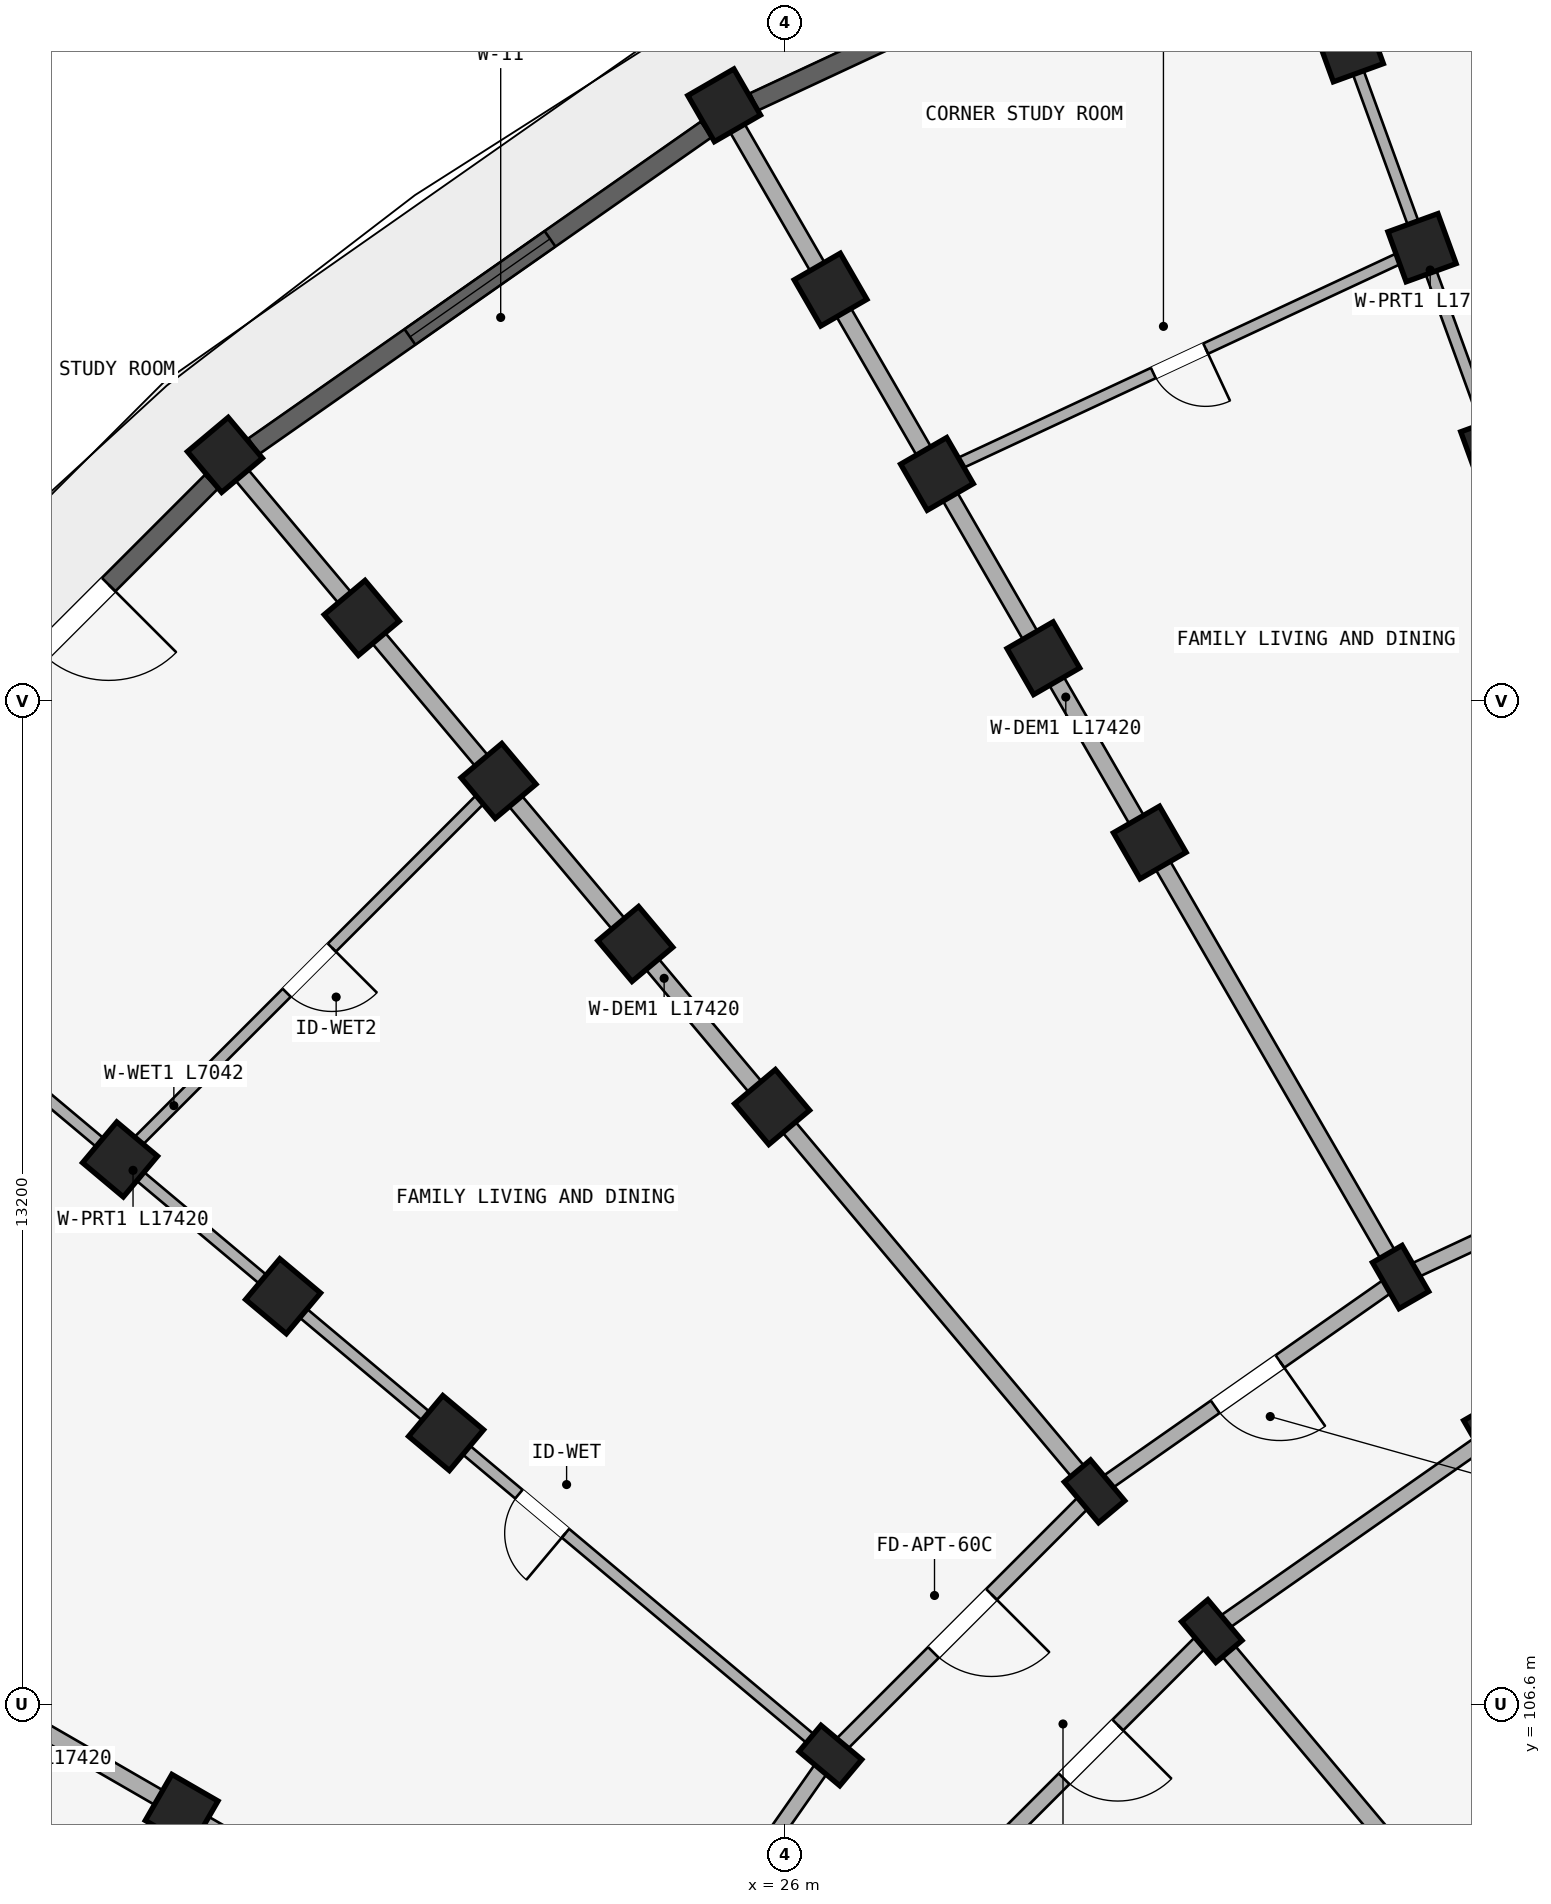
"""IFC4 building model, lengths in metres.
Left out: names, types, materials, properties, quantities, classifications, styles, units other than length and angle.
Written with IfcOpenShell. Run it as: python <this file> out.ifc"""

import sys

from ifc_helpers import new_model, si_unit, direction, frame, frame_2d, origin, origin_2d, place, context, subcontext, project, spatial, rectangle, extrude, element, fill, save


model = new_model("IFC4")
c1 = context("Model", 3, precision=1e-05, world=origin(), true_north=direction((0.0, 1.0)))
c2 = subcontext(c1, "Body", "Model", "MODEL_VIEW")
j1 = project(units=[si_unit("LENGTHUNIT", "METRE"), si_unit("PLANEANGLEUNIT", "RADIAN")], contexts=[c1])
p1 = place(None, origin())
s1 = spatial("IfcSite", under=j1, at=p1, CompositionType="ELEMENT")
p2 = place(p1, origin())
s2 = spatial("IfcBuilding", under=s1, at=p2, CompositionType="ELEMENT")
p3 = place(p2, frame((0.0, 0.0, 21.3)))
s3 = spatial("IfcBuildingStorey", under=s2, at=p3, CompositionType="ELEMENT", Elevation=21.3)
for number, where, z_axis, x_axis in (
    (1, (35.34, 123.132, 0.0), (0.0, 0.0, 1.0), (0.94, 0.342, 0.0)),
    (2, (34.382, 125.764, 0.0), (0.0, 0.0, 1.0), (0.94, 0.342, 0.0)),
    (3, (33.425, 128.395, 0.0), (0.0, 0.0, 1.0), (0.94, 0.342, 0.0)),
):
    element("IfcColumn", number, at=place(p3, frame(where, z_axis=z_axis, x_axis=x_axis)), inside=s3, PredefinedType="COLUMN", context=c2, shape_type="SweptSolid", body=[
        extrude(rectangle(XDim=0.7, YDim=0.7, at=origin_2d()), origin(), (0.0, 0.0, 1.0), 2.93),
    ])
for number, where, z_axis, x_axis in (
    (4, (35.3, 110.144, 0.0), (0.0, 0.0, 1.0), (0.866, 0.5, 0.0)),
    (5, (34.1, 112.222, 0.0), (0.0, 0.0, 1.0), (0.866, 0.5, 0.0)),
):
    element("IfcColumn", number, at=place(p3, frame(where, z_axis=z_axis, x_axis=x_axis)), inside=s3, PredefinedType="COLUMN", context=c2, shape_type="SweptSolid", body=[
        extrude(rectangle(XDim=0.45, YDim=0.7, at=origin_2d()), origin(), (0.0, 0.0, 1.0), 2.93),
    ])
for number, where, z_axis, x_axis in (
    (6, (30.8, 117.938, 0.0), (0.0, 0.0, 1.0), (0.866, 0.5, 0.0)),
    (7, (29.4, 120.363, 0.0), (0.0, 0.0, 1.0), (0.866, 0.5, 0.0)),
    (8, (28.0, 122.787, 0.0), (0.0, 0.0, 1.0), (0.866, 0.5, 0.0)),
    (9, (26.6, 125.212, 0.0), (0.0, 0.0, 1.0), (0.866, 0.5, 0.0)),
    (10, (25.2, 127.637, 0.0), (0.0, 0.0, 1.0), (0.866, 0.5, 0.0)),
):
    element("IfcColumn", number, at=place(p3, frame(where, z_axis=z_axis, x_axis=x_axis)), inside=s3, PredefinedType="COLUMN", context=c2, shape_type="SweptSolid", body=[
        extrude(rectangle(XDim=0.7, YDim=0.7, at=origin_2d()), origin(), (0.0, 0.0, 1.0), 2.93),
    ])
for number, where, z_axis, x_axis in (
    (11, (31.616, 107.564, 0.0), (0.0, 0.0, 1.0), (0.766, 0.643, 0.0)),
    (12, (30.073, 109.402, 0.0), (0.0, 0.0, 1.0), (0.766, 0.643, 0.0)),
):
    element("IfcColumn", number, at=place(p3, frame(where, z_axis=z_axis, x_axis=x_axis)), inside=s3, PredefinedType="COLUMN", context=c2, shape_type="SweptSolid", body=[
        extrude(rectangle(XDim=0.45, YDim=0.7, at=origin_2d()), origin(), (0.0, 0.0, 1.0), 2.93),
    ])
for number, where, z_axis, x_axis in (
    (13, (25.831, 114.458, 0.0), (0.0, 0.0, 1.0), (0.766, 0.643, 0.0)),
    (14, (24.031, 116.603, 0.0), (0.0, 0.0, 1.0), (0.766, 0.643, 0.0)),
    (15, (22.231, 118.748, 0.0), (0.0, 0.0, 1.0), (0.766, 0.643, 0.0)),
    (16, (20.432, 120.893, 0.0), (0.0, 0.0, 1.0), (0.766, 0.643, 0.0)),
    (17, (18.632, 123.038, 0.0), (0.0, 0.0, 1.0), (0.766, 0.643, 0.0)),
):
    element("IfcColumn", number, at=place(p3, frame(where, z_axis=z_axis, x_axis=x_axis)), inside=s3, PredefinedType="COLUMN", context=c2, shape_type="SweptSolid", body=[
        extrude(rectangle(XDim=0.7, YDim=0.7, at=origin_2d()), origin(), (0.0, 0.0, 1.0), 2.93),
    ])
p4 = place(p3, frame((26.598, 105.927, 0.0), z_axis=(0.0, 0.0, 1.0), x_axis=(0.642787609687, 0.766044443119, 0.0)))
e18 = element("IfcColumn", 18, at=p4, inside=s3, PredefinedType="COLUMN", context=c2, shape_type="SweptSolid", body=[
    extrude(rectangle(XDim=0.45, YDim=0.7, at=origin_2d()), origin(), (0.0, 0.0, 1.0), 2.93),
])
for number, where, z_axis, x_axis in (
    (19, (21.542, 110.169, 0.0), (0.0, 0.0, 1.0), (0.643, 0.766, 0.0)),
    (20, (19.397, 111.969, 0.0), (0.0, 0.0, 1.0), (0.643, 0.766, 0.0)),
    (21, (17.252, 113.769, 0.0), (0.0, 0.0, 1.0), (0.643, 0.766, 0.0)),
    (22, (18.062, 105.2, 0.0), (0.0, 0.0, 1.0), (0.5, 0.866, 0.0)),
):
    element("IfcColumn", number, at=place(p3, frame(where, z_axis=z_axis, x_axis=x_axis)), inside=s3, PredefinedType="COLUMN", context=c2, shape_type="SweptSolid", body=[
        extrude(rectangle(XDim=0.7, YDim=0.7, at=origin_2d()), origin(), (0.0, 0.0, 1.0), 2.93),
    ])
p5 = place(p3, frame((38.555, 114.299, 0.0), z_axis=(0.0, 0.0, 1.0), x_axis=(-0.906302381024, -0.422629854778, 0.0)))
e23 = element("IfcWall", 23, at=p5, inside=s3, PredefinedType="STANDARD", context=c2, shape_type="SweptSolid", body=[
    extrude(rectangle(XDim=4.915, YDim=0.2, at=frame_2d((2.458, 0.0))), origin(), (0.0, 0.0, 1.0), 2.372),
])
p6 = place(p3, frame((35.3, 110.144, 0.0), z_axis=(0.0, 0.0, 1.0), x_axis=(-0.819155404658, -0.573571637217, 0.0)))
e24 = element("IfcWall", 24, at=p6, inside=s3, PredefinedType="STANDARD", context=c2, shape_type="SweptSolid", body=[
    extrude(rectangle(XDim=4.497, YDim=0.2, at=frame_2d((2.249, 0.0))), origin(), (0.0, 0.0, 1.0), 2.372),
])
p7 = place(p3, frame((34.1, 112.222, 0.0), z_axis=(0.0, 0.0, 1.0), x_axis=(-0.819140911474, -0.573592335331, 0.0)))
e25 = element("IfcWall", 25, at=p7, inside=s3, PredefinedType="STANDARD", context=c2, shape_type="SweptSolid", body=[
    extrude(rectangle(XDim=4.916, YDim=0.2, at=frame_2d((2.458, 0.0))), origin(), (0.0, 0.0, 1.0), 2.372),
])
p8 = place(p7, frame((1.938, 0.0, 0.0)))
e26 = element("IfcOpeningElement", 26, at=p8, cuts=e25, PredefinedType="OPENING", context=c2, shape_type="SweptSolid", body=[
    extrude(rectangle(XDim=1.04, YDim=2.15, at=frame_2d((0.52, 1.075))), frame((0.0, 0.11, 0.0), z_axis=(0.0, -1.0, 0.0), x_axis=(1.0, 0.0, 0.0)), (0.0, 0.0, 1.0), 0.22),
])
p9 = place(p3, frame((31.616, 107.564, 0.0), z_axis=(0.0, 0.0, 1.0), x_axis=(-0.707106781187, -0.707106781187, 0.0)))
e27 = element("IfcWall", 27, at=p9, inside=s3, PredefinedType="STANDARD", context=c2, shape_type="SweptSolid", body=[
    extrude(rectangle(XDim=4.497, YDim=0.2, at=frame_2d((2.249, 0.0))), origin(), (0.0, 0.0, 1.0), 2.372),
])
p10 = place(p9, frame((1.749, 0.0, 0.0)))
e28 = element("IfcOpeningElement", 28, at=p10, cuts=e27, PredefinedType="OPENING", context=c2, shape_type="SweptSolid", body=[
    extrude(rectangle(XDim=1.0, YDim=2.15, at=frame_2d((0.5, 1.075))), frame((0.0, 0.11, 0.0), z_axis=(0.0, -1.0, 0.0), x_axis=(1.0, 0.0, 0.0)), (0.0, 0.0, 1.0), 0.22),
])
p11 = place(p3, frame((30.073, 109.402, 0.0), z_axis=(0.0, 0.0, 1.0), x_axis=(-0.707106781187, -0.707106781187, 0.0)))
e29 = element("IfcWall", 29, at=p11, inside=s3, PredefinedType="STANDARD", context=c2, shape_type="SweptSolid", body=[
    extrude(rectangle(XDim=4.916, YDim=0.2, at=frame_2d((2.458, 0.0))), origin(), (0.0, 0.0, 1.0), 2.372),
])
p12 = place(p11, frame((1.918, 0.0, 0.0)))
e30 = element("IfcOpeningElement", 30, at=p12, cuts=e29, PredefinedType="OPENING", context=c2, shape_type="SweptSolid", body=[
    extrude(rectangle(XDim=1.08, YDim=2.15, at=frame_2d((0.54, 1.075))), frame((0.0, 0.11, 0.0), z_axis=(0.0, -1.0, 0.0), x_axis=(1.0, 0.0, 0.0)), (0.0, 0.0, 1.0), 0.22),
])
p13 = place(p3, frame((26.598, 105.927, 0.0), z_axis=(0.0, 0.0, 1.0), x_axis=(-0.573592335331, -0.819140911474, 0.0)))
e31 = element("IfcWall", 31, at=p13, inside=s3, PredefinedType="STANDARD", context=c2, shape_type="SweptSolid", body=[
    extrude(rectangle(XDim=4.916, YDim=0.2, at=frame_2d((2.458, 0.0))), origin(), (0.0, 0.0, 1.0), 2.372),
])
p14 = place(p3, frame((38.521, 114.393, 0.0), z_axis=(0.0, 0.0, 1.0), x_axis=(-0.342022120477, 0.939691901159, 0.0)))
e32 = element("IfcWall", 32, at=p14, inside=s3, PredefinedType="PARTITIONING", context=c2, shape_type="SweptSolid", body=[
    extrude(rectangle(XDim=17.42, YDim=0.15, at=frame_2d((8.71, 0.0))), origin(), (0.0, 0.0, 1.0), 2.372),
])
p15 = place(p14, frame((4.45, 0.0, 0.0)))
e33 = element("IfcOpeningElement", 33, at=p15, cuts=e32, PredefinedType="OPENING", context=c2, shape_type="SweptSolid", body=[
    extrude(rectangle(XDim=0.8, YDim=2.1, at=frame_2d((0.4, 1.05))), frame((0.0, 0.085, 0.0), z_axis=(0.0, -1.0, 0.0), x_axis=(1.0, 0.0, 0.0)), (0.0, 0.0, 1.0), 0.17),
])
p16 = place(p3, frame((34.05, 112.309, 0.0), z_axis=(0.0, 0.0, 1.0), x_axis=(-0.499997843263, 0.866026648973, 0.0)))
e34 = element("IfcWall", 34, at=p16, inside=s3, PredefinedType="STANDARD", context=c2, shape_type="SweptSolid", body=[
    extrude(rectangle(XDim=17.42, YDim=0.22, at=frame_2d((8.71, 0.0))), origin(), (0.0, 0.0, 1.0), 2.372),
])
p17 = place(p3, frame((35.987, 102.355, 0.0), z_axis=(0.0, 0.0, 1.0), x_axis=(-0.642784846501, 0.766046761698, 0.0)))
e35 = element("IfcWall", 35, at=p17, inside=s3, PredefinedType="STANDARD", context=c2, shape_type="SweptSolid", body=[
    extrude(rectangle(XDim=6.75, YDim=0.22, at=frame_2d((3.375, 0.0))), origin(), (0.0, 0.0, 1.0), 2.372),
])
p18 = place(p3, frame((30.009, 109.479, 0.0), z_axis=(0.0, 0.0, 1.0), x_axis=(-0.642784757967, 0.766046835987, 0.0)))
e36 = element("IfcWall", 36, at=p18, inside=s3, PredefinedType="STANDARD", context=c2, shape_type="SweptSolid", body=[
    extrude(rectangle(XDim=17.42, YDim=0.22, at=frame_2d((8.71, 0.0))), origin(), (0.0, 0.0, 1.0), 2.372),
])
p19 = place(p3, frame((26.521, 105.991, 0.0), z_axis=(0.0, 0.0, 1.0), x_axis=(-0.766046835987, 0.642784757967, 0.0)))
e37 = element("IfcWall", 37, at=p19, inside=s3, PredefinedType="PARTITIONING", context=c2, shape_type="SweptSolid", body=[
    extrude(rectangle(XDim=17.42, YDim=0.15, at=frame_2d((8.71, 0.0))), origin(), (0.0, 0.0, 1.0), 2.372),
])
p20 = place(p19, frame((4.45, 0.0, 0.0)))
e38 = element("IfcOpeningElement", 38, at=p20, cuts=e37, PredefinedType="OPENING", context=c2, shape_type="SweptSolid", body=[
    extrude(rectangle(XDim=0.8, YDim=2.1, at=frame_2d((0.4, 1.05))), frame((0.0, 0.085, 0.0), z_axis=(0.0, -1.0, 0.0), x_axis=(1.0, 0.0, 0.0)), (0.0, 0.0, 1.0), 0.17),
])
p21 = place(p3, frame((23.691, 101.95, 0.0), z_axis=(0.0, 0.0, 1.0), x_axis=(-0.866026648973, 0.499997843263, 0.0)))
e39 = element("IfcWall", 39, at=p21, inside=s3, PredefinedType="STANDARD", context=c2, shape_type="SweptSolid", body=[
    extrude(rectangle(XDim=17.42, YDim=0.22, at=frame_2d((8.71, 0.0))), origin(), (0.0, 0.0, 1.0), 2.372),
])
p22 = place(p3, frame((34.382, 125.764, 0.0), z_axis=(0.0, 0.0, 1.0), x_axis=(-0.906297360311, -0.422640621205, 0.0)))
e40 = element("IfcWall", 40, at=p22, inside=s3, PredefinedType="PLUMBINGWALL", context=c2, shape_type="SweptSolid", body=[
    extrude(rectangle(XDim=7.042, YDim=0.15, at=frame_2d((3.521, 0.0))), origin(), (0.0, 0.0, 1.0), 2.372),
])
p23 = place(p22, frame((3.141, 0.0, 0.0)))
e41 = element("IfcOpeningElement", 41, at=p23, cuts=e40, PredefinedType="OPENING", context=c2, shape_type="SweptSolid", body=[
    extrude(rectangle(XDim=0.76, YDim=2.05, at=frame_2d((0.38, 1.025))), frame((0.0, 0.085, 0.0), z_axis=(0.0, -1.0, 0.0), x_axis=(1.0, 0.0, 0.0)), (0.0, 0.0, 1.0), 0.17),
])
p24 = place(p3, frame((22.231, 118.748, 0.0), z_axis=(0.0, 0.0, 1.0), x_axis=(-0.707106781187, -0.707106781187, 0.0)))
e42 = element("IfcWall", 42, at=p24, inside=s3, PredefinedType="PLUMBINGWALL", context=c2, shape_type="SweptSolid", body=[
    extrude(rectangle(XDim=7.042, YDim=0.15, at=frame_2d((3.521, 0.0))), origin(), (0.0, 0.0, 1.0), 2.372),
])
p25 = place(p24, frame((3.101, 0.0, 0.0)))
e43 = element("IfcOpeningElement", 43, at=p25, cuts=e42, PredefinedType="OPENING", context=c2, shape_type="SweptSolid", body=[
    extrude(rectangle(XDim=0.84, YDim=2.1, at=frame_2d((0.42, 1.05))), frame((0.0, 0.085, 0.0), z_axis=(0.0, -1.0, 0.0), x_axis=(1.0, 0.0, 0.0)), (0.0, 0.0, 1.0), 0.17),
])
p26 = place(p3, frame((32.179, 130.754, 0.0), z_axis=(0.0, 0.0, 1.0), x_axis=(-0.90630327107, -0.422627946127, 0.0)))
e44 = element("IfcWall", 44, at=p26, inside=s3, PredefinedType="STANDARD", context=c2, shape_type="SweptSolid", body=[
    extrude(rectangle(XDim=7.267, YDim=0.25, at=frame_2d((3.633, 0.0))), origin(), (0.0, 0.0, 1.0), 2.472),
])
p27 = place(p26, frame((2.808, 0.0, 0.522)))
e45 = element("IfcOpeningElement", 45, at=p27, cuts=e44, PredefinedType="OPENING", context=c2, shape_type="SweptSolid", body=[
    extrude(rectangle(XDim=1.65, YDim=1.75, at=frame_2d((0.825, 0.875))), frame((0.0, 0.135, 0.0), z_axis=(0.0, -1.0, 0.0), x_axis=(1.0, 0.0, 0.0)), (0.0, 0.0, 1.0), 0.27),
])
p28 = place(p3, frame((24.964, 127.319, 0.0), z_axis=(0.0, 0.0, 1.0), x_axis=(-0.819159308599, -0.573566061701, 0.0)))
e46 = element("IfcWall", 46, at=p28, inside=s3, PredefinedType="STANDARD", context=c2, shape_type="SweptSolid", body=[
    extrude(rectangle(XDim=7.267, YDim=0.25, at=frame_2d((3.633, 0.0))), origin(), (0.0, 0.0, 1.0), 2.472),
])
p29 = place(p28, frame((2.508, 0.0, 0.322)))
e47 = element("IfcOpeningElement", 47, at=p29, cuts=e46, PredefinedType="OPENING", context=c2, shape_type="SweptSolid", body=[
    extrude(rectangle(XDim=2.25, YDim=1.95, at=frame_2d((1.125, 0.975))), frame((0.0, 0.135, 0.0), z_axis=(0.0, -1.0, 0.0), x_axis=(1.0, 0.0, 0.0)), (0.0, 0.0, 1.0), 0.27),
])
p30 = place(p3, frame((18.454, 122.684, 0.0), z_axis=(0.0, 0.0, 1.0), x_axis=(-0.707106781187, -0.707106781187, 0.0)))
e48 = element("IfcWall", 48, at=p30, inside=s3, PredefinedType="STANDARD", context=c2, shape_type="SweptSolid", body=[
    extrude(rectangle(XDim=7.267, YDim=0.25, at=frame_2d((3.633, 0.0))), origin(), (0.0, 0.0, 1.0), 2.472),
])
p31 = place(p30, frame((4.766, 0.0, 0.472)))
e49 = element("IfcOpeningElement", 49, at=p31, cuts=e48, PredefinedType="OPENING", context=c2, shape_type="SweptSolid", body=[
    extrude(rectangle(XDim=1.2, YDim=1.5, at=frame_2d((0.6, 0.75))), frame((0.0, 0.135, 0.0), z_axis=(0.0, -1.0, 0.0), x_axis=(1.0, 0.0, 0.0)), (0.0, 0.0, 1.0), 0.27),
])
p32 = place(p30, frame((1.913, 0.0, 0.0)))
e50 = element("IfcOpeningElement", 50, at=p32, cuts=e48, PredefinedType="OPENING", context=c2, shape_type="SweptSolid", body=[
    extrude(rectangle(XDim=1.26, YDim=2.15, at=frame_2d((0.63, 1.075))), frame((0.0, 0.135, 0.0), z_axis=(0.0, -1.0, 0.0), x_axis=(1.0, 0.0, 0.0)), (0.0, 0.0, 1.0), 0.27),
])
p33 = place(p29, origin())
e51 = element("IfcWindow", 51, at=p33, inside=s3, PartitioningType="TRIPLE_PANEL_VERTICAL", PredefinedType="WINDOW", context=c2, shape_type="SweptSolid", body=[
    extrude(rectangle(XDim=2.25, YDim=1.95, at=frame_2d((1.125, 0.975))), frame((0.0, 0.03, 0.0), z_axis=(0.0, -1.0, 0.0), x_axis=(1.0, 0.0, 0.0)), (0.0, 0.0, 1.0), 0.06),
])
fill(e47, e51)
p34 = place(p20, origin())
e52 = element("IfcDoor", 52, at=p34, inside=s3, OperationType="SINGLE_SWING_LEFT", PredefinedType="DOOR", context=c2, shape_type="SweptSolid", body=[
    extrude(rectangle(XDim=0.8, YDim=2.1, at=frame_2d((0.4, 1.05))), frame((0.0, 0.025, 0.0), z_axis=(0.0, -1.0, 0.0), x_axis=(1.0, 0.0, 0.0)), (0.0, 0.0, 1.0), 0.05),
])
fill(e38, e52)
p35 = place(p23, origin())
e53 = element("IfcDoor", 53, at=p35, inside=s3, OperationType="SINGLE_SWING_LEFT", PredefinedType="DOOR", context=c2, shape_type="SweptSolid", body=[
    extrude(rectangle(XDim=0.76, YDim=2.05, at=frame_2d((0.38, 1.025))), frame((0.0, 0.025, 0.0), z_axis=(0.0, -1.0, 0.0), x_axis=(1.0, 0.0, 0.0)), (0.0, 0.0, 1.0), 0.05),
])
fill(e41, e53)
p36 = place(p8, frame((1.04, 0.0, 0.0), z_axis=(0.0, 0.0, 1.0), x_axis=(-1.0, 0.0, 0.0)))
e54 = element("IfcDoor", 54, at=p36, inside=s3, OperationType="SINGLE_SWING_RIGHT", PredefinedType="DOOR", context=c2, shape_type="SweptSolid", body=[
    extrude(rectangle(XDim=1.04, YDim=2.15, at=frame_2d((0.52, 1.075))), frame((0.0, 0.025, 0.0), z_axis=(0.0, -1.0, 0.0), x_axis=(1.0, 0.0, 0.0)), (0.0, 0.0, 1.0), 0.05),
])
fill(e26, e54)
p37 = place(p12, origin())
e55 = element("IfcDoor", 55, at=p37, inside=s3, OperationType="SINGLE_SWING_LEFT", PredefinedType="DOOR", context=c2, shape_type="SweptSolid", body=[
    extrude(rectangle(XDim=1.08, YDim=2.15, at=frame_2d((0.54, 1.075))), frame((0.0, 0.025, 0.0), z_axis=(0.0, -1.0, 0.0), x_axis=(1.0, 0.0, 0.0)), (0.0, 0.0, 1.0), 0.05),
])
fill(e30, e55)
p38 = place(p25, frame((0.84, 0.0, 0.0), z_axis=(0.0, 0.0, 1.0), x_axis=(-1.0, 0.0, 0.0)))
e56 = element("IfcDoor", 56, at=p38, inside=s3, OperationType="SINGLE_SWING_RIGHT", PredefinedType="DOOR", context=c2, shape_type="SweptSolid", body=[
    extrude(rectangle(XDim=0.84, YDim=2.1, at=frame_2d((0.42, 1.05))), frame((0.0, 0.025, 0.0), z_axis=(0.0, -1.0, 0.0), x_axis=(1.0, 0.0, 0.0)), (0.0, 0.0, 1.0), 0.05),
])
fill(e43, e56)
p39 = place(p10, origin())
e57 = element("IfcDoor", 57, at=p39, inside=s3, OperationType="SINGLE_SWING_LEFT", PredefinedType="DOOR", context=c2, shape_type="SweptSolid", body=[
    extrude(rectangle(XDim=1.0, YDim=2.15, at=frame_2d((0.5, 1.075))), frame((0.0, 0.025, 0.0), z_axis=(0.0, -1.0, 0.0), x_axis=(1.0, 0.0, 0.0)), (0.0, 0.0, 1.0), 0.05),
])
fill(e28, e57)
p40 = place(p32, frame((1.26, 0.0, 0.0), z_axis=(0.0, 0.0, 1.0), x_axis=(-1.0, 0.0, 0.0)))
e58 = element("IfcDoor", 58, at=p40, inside=s3, OperationType="SINGLE_SWING_RIGHT", PredefinedType="DOOR", context=c2, shape_type="SweptSolid", body=[
    extrude(rectangle(XDim=1.26, YDim=2.15, at=frame_2d((0.63, 1.075))), frame((0.0, 0.025, 0.0), z_axis=(0.0, -1.0, 0.0), x_axis=(1.0, 0.0, 0.0)), (0.0, 0.0, 1.0), 0.05),
])
fill(e50, e58)
save(model, sys.argv[1])
